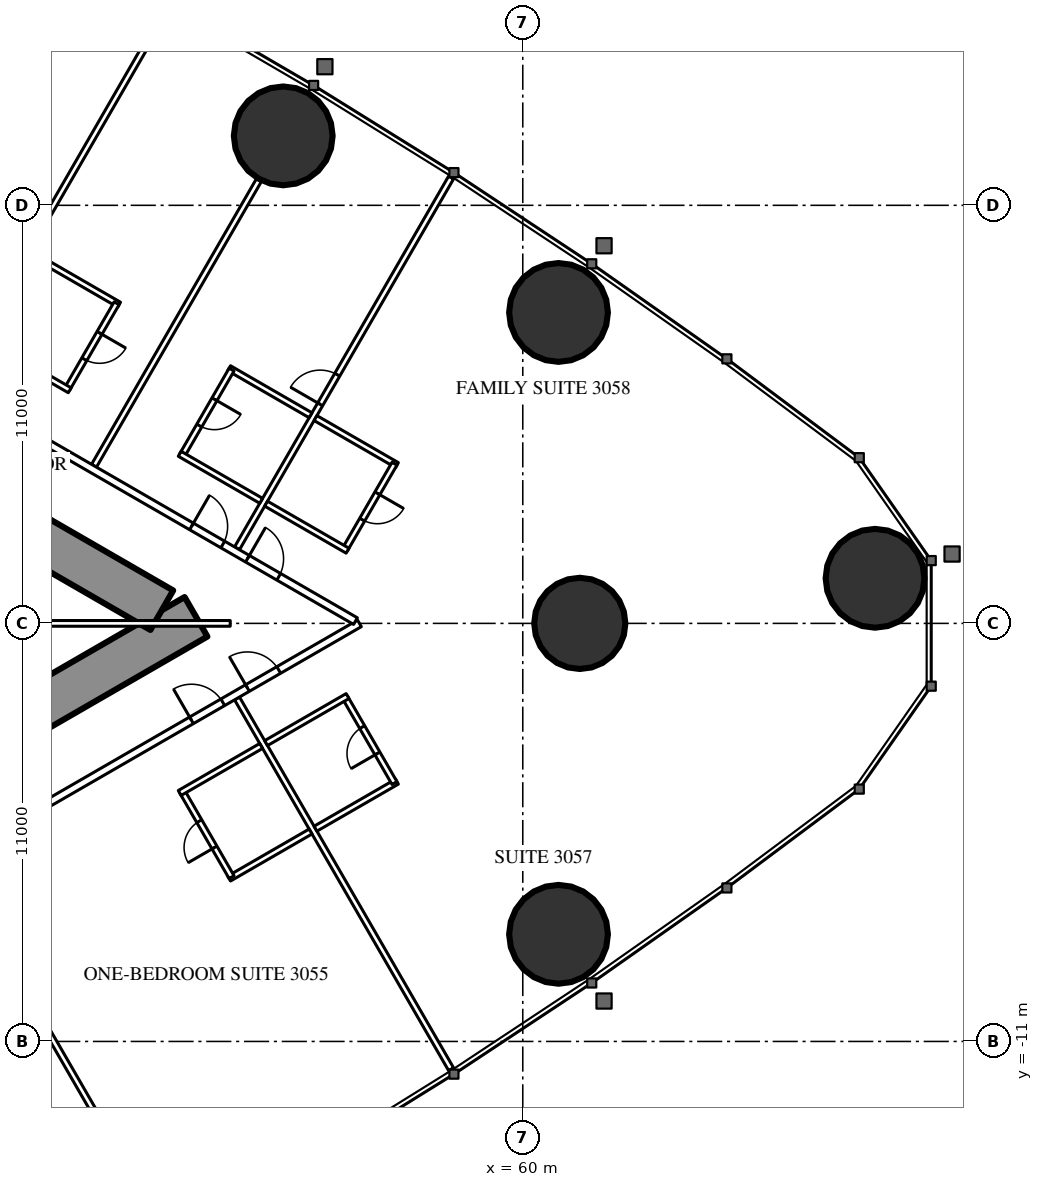
"""IFC4 building model, lengths in metres.
Left out: names, types, materials, properties, quantities, classifications, styles, units other than length and angle.
Written with IfcOpenShell. Run it as: python <this file> out.ifc"""

import sys

from ifc_helpers import new_model, si_unit, direction, frame, frame_2d, origin, origin_2d, place, context, subcontext, project, spatial, rectangle, circle, hollow_circle, extrude, element, fill, save


model = new_model("IFC4")
c1 = context("Model", 3, precision=1e-05, world=origin(), true_north=direction((0.0, 1.0)))
c2 = subcontext(c1, "Body", "Model", "MODEL_VIEW")
j1 = project(units=[si_unit("LENGTHUNIT", "METRE"), si_unit("PLANEANGLEUNIT", "RADIAN")], contexts=[c1])
p1 = place(None, origin())
s1 = spatial("IfcSite", under=j1, at=p1, CompositionType="ELEMENT")
p2 = place(p1, origin())
s2 = spatial("IfcBuilding", under=s1, at=p2, CompositionType="ELEMENT")
p3 = place(p2, frame((0.0, 0.0, 115.1)))
s3 = spatial("IfcBuildingStorey", under=s2, at=p3, CompositionType="ELEMENT", Elevation=115.1)
for number, where, z_axis, x_axis in (
    (1, (69.269, 1.187, 0.0), (0.0, 0.0, 1.0), (1.0, 0.0, 0.0)),
    (2, (60.941, 8.181, 0.0), (0.0, 0.0, 1.0), (1.0, 0.0, 0.0)),
    (3, (53.697, 12.827, 0.0), (0.0, 0.0, 1.0), (1.0, 0.0, 0.0)),
    (4, (60.941, -8.181, 0.0), (0.0, 0.0, 1.0), (1.0, 0.0, 0.0)),
):
    element("IfcColumn", number, at=place(p3, frame(where, z_axis=z_axis, x_axis=x_axis)), inside=s3, PredefinedType="COLUMN", context=c2, shape_type="SweptSolid", body=[
        extrude(hollow_circle(Radius=1.3, WallThickness=0.1, at=origin_2d()), origin(), (0.0, 0.0, 1.0), 3.5),
    ])
p4 = place(p3, frame((61.5, 0.0, 0.0), z_axis=(0.0, 0.0, 1.0), x_axis=(1.0, 0.0, 0.0)))
e5 = element("IfcColumn", 5, at=p4, inside=s3, PredefinedType="COLUMN", context=c2, shape_type="SweptSolid", body=[
    extrude(circle(Radius=1.2, at=origin_2d()), origin(), (0.0, 0.0, 1.0), 3.5),
])
p5 = place(p3, frame((27.2, -13.8, 0.0), z_axis=(0.0, 0.0, 1.0), x_axis=(0.866027159892, 0.499996958321, 0.0)))
e6 = element("IfcWall", 6, at=p5, inside=s3, PredefinedType="SHEAR", context=c2, shape_type="SweptSolid", body=[
    extrude(rectangle(XDim=27.947, YDim=1.2, at=frame_2d((13.973, 0.0))), origin(), (0.0, 0.0, 1.0), 3.5),
])
p6 = place(p5, frame((4.6, 0.0, 0.0)))
e7 = element("IfcOpeningElement", 7, at=p6, cuts=e6, PredefinedType="OPENING", context=c2, shape_type="SweptSolid", body=[
    extrude(rectangle(XDim=1.0, YDim=2.2, at=frame_2d((0.5, 1.1))), frame((0.0, 0.61, 0.0), z_axis=(0.0, -1.0, 0.0), x_axis=(1.0, 0.0, 0.0)), (0.0, 0.0, 1.0), 1.22),
])
p7 = place(p5, frame((13.395, 0.0, 0.0)))
e8 = element("IfcOpeningElement", 8, at=p7, cuts=e6, PredefinedType="OPENING", context=c2, shape_type="SweptSolid", body=[
    extrude(rectangle(XDim=1.8, YDim=2.2, at=frame_2d((0.9, 1.1))), frame((0.0, 0.61, 0.0), z_axis=(0.0, -1.0, 0.0), x_axis=(1.0, 0.0, 0.0)), (0.0, 0.0, 1.0), 1.22),
])
p8 = place(p3, frame((27.2, 13.8, 0.0), z_axis=(0.0, 0.0, 1.0), x_axis=(0.866024515034, -0.500001539357, 0.0)))
e9 = element("IfcWall", 9, at=p8, inside=s3, PredefinedType="SHEAR", context=c2, shape_type="SweptSolid", body=[
    extrude(rectangle(XDim=26.907, YDim=1.2, at=frame_2d((13.454, 0.0))), origin(), (0.0, 0.0, 1.0), 3.5),
])
p9 = place(p8, frame((4.6, 0.0, 0.0)))
e10 = element("IfcOpeningElement", 10, at=p9, cuts=e9, PredefinedType="OPENING", context=c2, shape_type="SweptSolid", body=[
    extrude(rectangle(XDim=1.0, YDim=2.2, at=frame_2d((0.5, 1.1))), frame((0.0, 0.61, 0.0), z_axis=(0.0, -1.0, 0.0), x_axis=(1.0, 0.0, 0.0)), (0.0, 0.0, 1.0), 1.22),
])
p10 = place(p8, frame((13.395, 0.0, 0.0)))
e11 = element("IfcOpeningElement", 11, at=p10, cuts=e9, PredefinedType="OPENING", context=c2, shape_type="SweptSolid", body=[
    extrude(rectangle(XDim=1.8, YDim=2.2, at=frame_2d((0.9, 1.1))), frame((0.0, 0.61, 0.0), z_axis=(0.0, -1.0, 0.0), x_axis=(1.0, 0.0, 0.0)), (0.0, 0.0, 1.0), 1.22),
])
p11 = place(p3, frame((44.954, -6.321, 0.0), z_axis=(0.0, 0.0, 1.0), x_axis=(0.500018676722, -0.866014620505, 0.0)))
e12 = element("IfcWall", 12, at=p11, inside=s3, PredefinedType="PARTITIONING", context=c2, shape_type="SweptSolid", body=[
    extrude(rectangle(XDim=8.704, YDim=0.15, at=frame_2d((4.352, 0.0))), origin(), (0.0, 0.0, 1.0), 2.2),
])
p12 = place(p3, frame((52.481, -1.975, 0.0), z_axis=(0.0, 0.0, 1.0), x_axis=(0.500003867771, -0.866023170714, 0.0)))
e13 = element("IfcWall", 13, at=p12, inside=s3, PredefinedType="PARTITIONING", context=c2, shape_type="SweptSolid", body=[
    extrude(rectangle(XDim=11.265, YDim=0.15, at=frame_2d((5.632, 0.0))), origin(), (0.0, 0.0, 1.0), 3.25),
])
p13 = place(p3, frame((44.954, 6.321, 0.0), z_axis=(0.0, 0.0, 1.0), x_axis=(0.500009815811, 0.866019736549, 0.0)))
e14 = element("IfcWall", 14, at=p13, inside=s3, PredefinedType="PARTITIONING", context=c2, shape_type="SweptSolid", body=[
    extrude(rectangle(XDim=11.424, YDim=0.15, at=frame_2d((5.712, 0.0))), origin(), (0.0, 0.0, 1.0), 3.25),
])
p14 = place(p3, frame((48.719, 4.147, 0.0), z_axis=(0.0, 0.0, 1.0), x_axis=(0.499993328235, 0.866029255696, 0.0)))
e15 = element("IfcWall", 15, at=p14, inside=s3, PredefinedType="PARTITIONING", context=c2, shape_type="SweptSolid", body=[
    extrude(rectangle(XDim=8.686, YDim=0.15, at=frame_2d((4.343, 0.0))), origin(), (0.0, 0.0, 1.0), 2.2),
])
p15 = place(p3, frame((52.481, 1.975, 0.0), z_axis=(0.0, 0.0, 1.0), x_axis=(0.500003867771, 0.866023170714, 0.0)))
e16 = element("IfcWall", 16, at=p15, inside=s3, PredefinedType="PARTITIONING", context=c2, shape_type="SweptSolid", body=[
    extrude(rectangle(XDim=11.265, YDim=0.15, at=frame_2d((5.632, 0.0))), origin(), (0.0, 0.0, 1.0), 3.25),
])
p16 = place(p15, frame((4.375, 0.0, 0.0)))
e17 = element("IfcOpeningElement", 17, at=p16, cuts=e16, PredefinedType="OPENING", context=c2, shape_type="SweptSolid", body=[
    extrude(rectangle(XDim=0.9, YDim=2.2, at=frame_2d((0.45, 1.1))), frame((0.0, 0.085, 0.0), z_axis=(0.0, -1.0, 0.0), x_axis=(1.0, 0.0, 0.0)), (0.0, 0.0, 1.0), 0.17),
])
p17 = place(p3, frame((37.96, -10.243, 0.0), z_axis=(0.0, 0.0, 1.0), x_axis=(0.866026429433, 0.499998223521, 0.0)))
e18 = element("IfcWall", 18, at=p17, inside=s3, PredefinedType="PARTITIONING", context=c2, shape_type="SweptSolid", body=[
    extrude(rectangle(XDim=20.487, YDim=0.2, at=frame_2d((10.243, 0.0))), origin(), (0.0, 0.0, 1.0), 3.25),
])
p18 = place(p17, frame((4.343, 0.0, 0.0)))
e19 = element("IfcOpeningElement", 19, at=p18, cuts=e18, PredefinedType="OPENING", context=c2, shape_type="SweptSolid", body=[
    extrude(rectangle(XDim=0.95, YDim=2.2, at=frame_2d((0.475, 1.1))), frame((0.0, 0.11, 0.0), z_axis=(0.0, -1.0, 0.0), x_axis=(1.0, 0.0, 0.0)), (0.0, 0.0, 1.0), 0.22),
])
p19 = place(p17, frame((15.385, 0.0, 0.0)))
e20 = element("IfcOpeningElement", 20, at=p19, cuts=e18, PredefinedType="OPENING", context=c2, shape_type="SweptSolid", body=[
    extrude(rectangle(XDim=0.95, YDim=2.2, at=frame_2d((0.475, 1.1))), frame((0.0, 0.11, 0.0), z_axis=(0.0, -1.0, 0.0), x_axis=(1.0, 0.0, 0.0)), (0.0, 0.0, 1.0), 0.22),
])
p20 = place(p17, frame((17.085, 0.0, 0.0)))
e21 = element("IfcOpeningElement", 21, at=p20, cuts=e18, PredefinedType="OPENING", context=c2, shape_type="SweptSolid", body=[
    extrude(rectangle(XDim=0.95, YDim=2.2, at=frame_2d((0.475, 1.1))), frame((0.0, 0.11, 0.0), z_axis=(0.0, -1.0, 0.0), x_axis=(1.0, 0.0, 0.0)), (0.0, 0.0, 1.0), 0.22),
])
p21 = place(p17, frame((1.048, 0.0, 0.0)))
e22 = element("IfcOpeningElement", 22, at=p21, cuts=e18, PredefinedType="OPENING", context=c2, shape_type="SweptSolid", body=[
    extrude(rectangle(XDim=1.8, YDim=2.2, at=frame_2d((0.9, 1.1))), frame((0.0, 0.11, 0.0), z_axis=(0.0, -1.0, 0.0), x_axis=(1.0, 0.0, 0.0)), (0.0, 0.0, 1.0), 0.22),
])
p22 = place(p3, frame((44.925, 6.222, 0.0), z_axis=(0.0, 0.0, 1.0), x_axis=(0.866025590081, -0.499999677325, 0.0)))
e23 = element("IfcWall", 23, at=p22, inside=s3, PredefinedType="PARTITIONING", context=c2, shape_type="SweptSolid", body=[
    extrude(rectangle(XDim=12.324, YDim=0.2, at=frame_2d((6.162, 0.0))), origin(), (0.0, 0.0, 1.0), 3.25),
])
p23 = place(p22, frame((9.042, 0.0, 0.0)))
e24 = element("IfcOpeningElement", 24, at=p23, cuts=e23, PredefinedType="OPENING", context=c2, shape_type="SweptSolid", body=[
    extrude(rectangle(XDim=0.95, YDim=2.2, at=frame_2d((0.475, 1.1))), frame((0.0, 0.11, 0.0), z_axis=(0.0, -1.0, 0.0), x_axis=(1.0, 0.0, 0.0)), (0.0, 0.0, 1.0), 0.22),
])
p24 = place(p22, frame((7.342, 0.0, 0.0)))
e25 = element("IfcOpeningElement", 25, at=p24, cuts=e23, PredefinedType="OPENING", context=c2, shape_type="SweptSolid", body=[
    extrude(rectangle(XDim=0.95, YDim=2.2, at=frame_2d((0.475, 1.1))), frame((0.0, 0.11, 0.0), z_axis=(0.0, -1.0, 0.0), x_axis=(1.0, 0.0, 0.0)), (0.0, 0.0, 1.0), 0.22),
])
p25 = place(p22, frame((0.6, 0.0, 0.0)))
e26 = element("IfcOpeningElement", 26, at=p25, cuts=e23, PredefinedType="OPENING", context=c2, shape_type="SweptSolid", body=[
    extrude(rectangle(XDim=0.95, YDim=2.2, at=frame_2d((0.475, 1.1))), frame((0.0, 0.11, 0.0), z_axis=(0.0, -1.0, 0.0), x_axis=(1.0, 0.0, 0.0)), (0.0, 0.0, 1.0), 0.22),
])
p26 = place(p3, frame((52.273, -6.714, 0.0), z_axis=(0.0, 0.0, 1.0), x_axis=(0.866031185235, 0.4999899861, 0.0)))
e27 = element("IfcWall", 27, at=p26, inside=s3, PredefinedType="PARTITIONING", context=c2, shape_type="SweptSolid", body=[
    extrude(rectangle(XDim=2.475, YDim=0.15, at=frame_2d((1.238, 0.0))), origin(), (0.0, 0.0, 1.0), 3.25),
])
p27 = place(p3, frame((51.038, -4.425, 0.0), z_axis=(0.0, 0.0, 1.0), x_axis=(0.49997716683, -0.86603858612, 0.0)))
e28 = element("IfcWall", 28, at=p27, inside=s3, PredefinedType="PARTITIONING", context=c2, shape_type="SweptSolid", body=[
    extrude(rectangle(XDim=2.6, YDim=0.15, at=frame_2d((1.3, 0.0))), origin(), (0.0, 0.0, 1.0), 3.25),
])
p28 = place(p27, frame((0.9, 0.0, 0.0)))
e29 = element("IfcOpeningElement", 29, at=p28, cuts=e28, PredefinedType="OPENING", context=c2, shape_type="SweptSolid", body=[
    extrude(rectangle(XDim=0.8, YDim=2.2, at=frame_2d((0.4, 1.1))), frame((0.0, 0.085, 0.0), z_axis=(0.0, -1.0, 0.0), x_axis=(1.0, 0.0, 0.0)), (0.0, 0.0, 1.0), 0.17),
])
p29 = place(p3, frame((50.973, -4.462, 0.0), z_axis=(0.0, 0.0, 1.0), x_axis=(0.866031185235, 0.4999899861, 0.0)))
e30 = element("IfcWall", 30, at=p29, inside=s3, PredefinedType="PARTITIONING", context=c2, shape_type="SweptSolid", body=[
    extrude(rectangle(XDim=2.475, YDim=0.15, at=frame_2d((1.238, 0.0))), origin(), (0.0, 0.0, 1.0), 3.25),
])
p30 = place(p3, frame((54.546, -5.402, 0.0), z_axis=(0.0, 0.0, 1.0), x_axis=(0.866006523861, 0.500032699561, 0.0)))
e31 = element("IfcWall", 31, at=p30, inside=s3, PredefinedType="PARTITIONING", context=c2, shape_type="SweptSolid", body=[
    extrude(rectangle(XDim=2.475, YDim=0.15, at=frame_2d((1.237, 0.0))), origin(), (0.0, 0.0, 1.0), 3.25),
])
p31 = place(p3, frame((55.325, -1.95, 0.0), z_axis=(0.0, 0.0, 1.0), x_axis=(0.500006934395, -0.866021400173, 0.0)))
e32 = element("IfcWall", 32, at=p31, inside=s3, PredefinedType="PARTITIONING", context=c2, shape_type="SweptSolid", body=[
    extrude(rectangle(XDim=2.6, YDim=0.15, at=frame_2d((1.3, 0.0))), origin(), (0.0, 0.0, 1.0), 3.25),
])
p32 = place(p31, frame((0.9, 0.0, 0.0)))
e33 = element("IfcOpeningElement", 33, at=p32, cuts=e32, PredefinedType="OPENING", context=c2, shape_type="SweptSolid", body=[
    extrude(rectangle(XDim=0.8, YDim=2.2, at=frame_2d((0.4, 1.1))), frame((0.0, 0.085, 0.0), z_axis=(0.0, -1.0, 0.0), x_axis=(1.0, 0.0, 0.0)), (0.0, 0.0, 1.0), 0.17),
])
for number, where, z_axis, x_axis in (
    (34, (53.246, -3.15, 0.0), (0.0, 0.0, 1.0), (0.866, 0.5, 0.0)),
    (35, (54.546, 5.402, 0.0), (0.0, 0.0, 1.0), (0.866, -0.5, 0.0)),
):
    element("IfcWall", number, at=place(p3, frame(where, z_axis=z_axis, x_axis=x_axis)), inside=s3, PredefinedType="PARTITIONING", context=c2, shape_type="SweptSolid", body=[
        extrude(rectangle(XDim=2.475, YDim=0.15, at=frame_2d((1.237, 0.0))), origin(), (0.0, 0.0, 1.0), 3.25),
    ])
p33 = place(p3, frame((55.325, 1.95, 0.0), z_axis=(0.0, 0.0, 1.0), x_axis=(0.500006934395, 0.866021400173, 0.0)))
e36 = element("IfcWall", 36, at=p33, inside=s3, PredefinedType="PARTITIONING", context=c2, shape_type="SweptSolid", body=[
    extrude(rectangle(XDim=2.6, YDim=0.15, at=frame_2d((1.3, 0.0))), origin(), (0.0, 0.0, 1.0), 3.25),
])
p34 = place(p33, frame((0.9, 0.0, 0.0)))
e37 = element("IfcOpeningElement", 37, at=p34, cuts=e36, PredefinedType="OPENING", context=c2, shape_type="SweptSolid", body=[
    extrude(rectangle(XDim=0.8, YDim=2.2, at=frame_2d((0.4, 1.1))), frame((0.0, 0.085, 0.0), z_axis=(0.0, -1.0, 0.0), x_axis=(1.0, 0.0, 0.0)), (0.0, 0.0, 1.0), 0.17),
])
p35 = place(p3, frame((53.246, 3.15, 0.0), z_axis=(0.0, 0.0, 1.0), x_axis=(0.866006523861, -0.500032699561, 0.0)))
e38 = element("IfcWall", 38, at=p35, inside=s3, PredefinedType="PARTITIONING", context=c2, shape_type="SweptSolid", body=[
    extrude(rectangle(XDim=2.475, YDim=0.15, at=frame_2d((1.237, 0.0))), origin(), (0.0, 0.0, 1.0), 3.25),
])
p36 = place(p3, frame((52.273, 6.714, 0.0), z_axis=(0.0, 0.0, 1.0), x_axis=(0.866031185235, -0.4999899861, 0.0)))
e39 = element("IfcWall", 39, at=p36, inside=s3, PredefinedType="PARTITIONING", context=c2, shape_type="SweptSolid", body=[
    extrude(rectangle(XDim=2.475, YDim=0.15, at=frame_2d((1.238, 0.0))), origin(), (0.0, 0.0, 1.0), 3.25),
])
p37 = place(p3, frame((51.038, 4.425, 0.0), z_axis=(0.0, 0.0, 1.0), x_axis=(0.49997716683, 0.86603858612, 0.0)))
e40 = element("IfcWall", 40, at=p37, inside=s3, PredefinedType="PARTITIONING", context=c2, shape_type="SweptSolid", body=[
    extrude(rectangle(XDim=2.6, YDim=0.15, at=frame_2d((1.3, 0.0))), origin(), (0.0, 0.0, 1.0), 3.25),
])
p38 = place(p37, frame((0.9, 0.0, 0.0)))
e41 = element("IfcOpeningElement", 41, at=p38, cuts=e40, PredefinedType="OPENING", context=c2, shape_type="SweptSolid", body=[
    extrude(rectangle(XDim=0.8, YDim=2.2, at=frame_2d((0.4, 1.1))), frame((0.0, 0.085, 0.0), z_axis=(0.0, -1.0, 0.0), x_axis=(1.0, 0.0, 0.0)), (0.0, 0.0, 1.0), 0.17),
])
p39 = place(p3, frame((50.973, 4.462, 0.0), z_axis=(0.0, 0.0, 1.0), x_axis=(0.866031185235, -0.4999899861, 0.0)))
e42 = element("IfcWall", 42, at=p39, inside=s3, PredefinedType="PARTITIONING", context=c2, shape_type="SweptSolid", body=[
    extrude(rectangle(XDim=2.475, YDim=0.15, at=frame_2d((1.238, 0.0))), origin(), (0.0, 0.0, 1.0), 3.25),
])
p40 = place(p3, frame((47.235, 9.623, 0.0), z_axis=(0.0, 0.0, 1.0), x_axis=(0.866006523861, -0.500032699561, 0.0)))
e43 = element("IfcWall", 43, at=p40, inside=s3, PredefinedType="PARTITIONING", context=c2, shape_type="SweptSolid", body=[
    extrude(rectangle(XDim=2.475, YDim=0.15, at=frame_2d((1.237, 0.0))), origin(), (0.0, 0.0, 1.0), 3.25),
])
p41 = place(p3, frame((48.013, 6.171, 0.0), z_axis=(0.0, 0.0, 1.0), x_axis=(0.500006934395, 0.866021400173, 0.0)))
e44 = element("IfcWall", 44, at=p41, inside=s3, PredefinedType="PARTITIONING", context=c2, shape_type="SweptSolid", body=[
    extrude(rectangle(XDim=2.6, YDim=0.15, at=frame_2d((1.3, 0.0))), origin(), (0.0, 0.0, 1.0), 3.25),
])
p42 = place(p41, frame((0.9, 0.0, 0.0)))
e45 = element("IfcOpeningElement", 45, at=p42, cuts=e44, PredefinedType="OPENING", context=c2, shape_type="SweptSolid", body=[
    extrude(rectangle(XDim=0.8, YDim=2.2, at=frame_2d((0.4, 1.1))), frame((0.0, 0.085, 0.0), z_axis=(0.0, -1.0, 0.0), x_axis=(1.0, 0.0, 0.0)), (0.0, 0.0, 1.0), 0.17),
])
p43 = place(p3, frame((45.935, 7.371, 0.0), z_axis=(0.0, 0.0, 1.0), x_axis=(0.866031185235, -0.4999899861, 0.0)))
e46 = element("IfcWall", 46, at=p43, inside=s3, PredefinedType="PARTITIONING", context=c2, shape_type="SweptSolid", body=[
    extrude(rectangle(XDim=2.475, YDim=0.15, at=frame_2d((1.238, 0.0))), origin(), (0.0, 0.0, 1.0), 3.25),
])
p44 = place(p3, frame((44.575, 0.0, 0.0), z_axis=(0.0, 0.0, 1.0), x_axis=(1.0, 0.0, 0.0)))
e47 = element("IfcWall", 47, at=p44, inside=s3, PredefinedType="PARTITIONING", context=c2, shape_type="SweptSolid", body=[
    extrude(rectangle(XDim=7.727, YDim=0.15, at=frame_2d((3.864, 0.0))), origin(), (0.0, 0.0, 1.0), 2.2),
])
p45 = place(p28, origin())
e48 = element("IfcDoor", 48, at=p45, inside=s3, OperationType="SINGLE_SWING_RIGHT", PredefinedType="DOOR", context=c2, shape_type="SweptSolid", body=[
    extrude(rectangle(XDim=0.8, YDim=2.2, at=frame_2d((0.4, 1.1))), frame((0.0, 0.025, 0.0), z_axis=(0.0, -1.0, 0.0), x_axis=(1.0, 0.0, 0.0)), (0.0, 0.0, 1.0), 0.05),
])
fill(e29, e48)
p46 = place(p19, origin())
e49 = element("IfcDoor", 49, at=p46, inside=s3, OperationType="SINGLE_SWING_LEFT", PredefinedType="DOOR", context=c2, shape_type="SweptSolid", body=[
    extrude(rectangle(XDim=0.95, YDim=2.2, at=frame_2d((0.475, 1.1))), frame((0.0, 0.025, 0.0), z_axis=(0.0, -1.0, 0.0), x_axis=(1.0, 0.0, 0.0)), (0.0, 0.0, 1.0), 0.05),
])
fill(e20, e49)
p47 = place(p32, origin())
e50 = element("IfcDoor", 50, at=p47, inside=s3, OperationType="SINGLE_SWING_RIGHT", PredefinedType="DOOR", context=c2, shape_type="SweptSolid", body=[
    extrude(rectangle(XDim=0.8, YDim=2.2, at=frame_2d((0.4, 1.1))), frame((0.0, 0.025, 0.0), z_axis=(0.0, -1.0, 0.0), x_axis=(1.0, 0.0, 0.0)), (0.0, 0.0, 1.0), 0.05),
])
fill(e33, e50)
p48 = place(p20, origin())
e51 = element("IfcDoor", 51, at=p48, inside=s3, OperationType="SINGLE_SWING_LEFT", PredefinedType="DOOR", context=c2, shape_type="SweptSolid", body=[
    extrude(rectangle(XDim=0.95, YDim=2.2, at=frame_2d((0.475, 1.1))), frame((0.0, 0.025, 0.0), z_axis=(0.0, -1.0, 0.0), x_axis=(1.0, 0.0, 0.0)), (0.0, 0.0, 1.0), 0.05),
])
fill(e21, e51)
p49 = place(p34, origin())
e52 = element("IfcDoor", 52, at=p49, inside=s3, OperationType="SINGLE_SWING_RIGHT", PredefinedType="DOOR", context=c2, shape_type="SweptSolid", body=[
    extrude(rectangle(XDim=0.8, YDim=2.2, at=frame_2d((0.4, 1.1))), frame((0.0, 0.025, 0.0), z_axis=(0.0, -1.0, 0.0), x_axis=(1.0, 0.0, 0.0)), (0.0, 0.0, 1.0), 0.05),
])
fill(e37, e52)
p50 = place(p23, origin())
e53 = element("IfcDoor", 53, at=p50, inside=s3, OperationType="SINGLE_SWING_LEFT", PredefinedType="DOOR", context=c2, shape_type="SweptSolid", body=[
    extrude(rectangle(XDim=0.95, YDim=2.2, at=frame_2d((0.475, 1.1))), frame((0.0, 0.025, 0.0), z_axis=(0.0, -1.0, 0.0), x_axis=(1.0, 0.0, 0.0)), (0.0, 0.0, 1.0), 0.05),
])
fill(e24, e53)
p51 = place(p38, origin())
e54 = element("IfcDoor", 54, at=p51, inside=s3, OperationType="SINGLE_SWING_RIGHT", PredefinedType="DOOR", context=c2, shape_type="SweptSolid", body=[
    extrude(rectangle(XDim=0.8, YDim=2.2, at=frame_2d((0.4, 1.1))), frame((0.0, 0.025, 0.0), z_axis=(0.0, -1.0, 0.0), x_axis=(1.0, 0.0, 0.0)), (0.0, 0.0, 1.0), 0.05),
])
fill(e41, e54)
p52 = place(p24, origin())
e55 = element("IfcDoor", 55, at=p52, inside=s3, OperationType="SINGLE_SWING_LEFT", PredefinedType="DOOR", context=c2, shape_type="SweptSolid", body=[
    extrude(rectangle(XDim=0.95, YDim=2.2, at=frame_2d((0.475, 1.1))), frame((0.0, 0.025, 0.0), z_axis=(0.0, -1.0, 0.0), x_axis=(1.0, 0.0, 0.0)), (0.0, 0.0, 1.0), 0.05),
])
fill(e25, e55)
p53 = place(p42, origin())
e56 = element("IfcDoor", 56, at=p53, inside=s3, OperationType="SINGLE_SWING_RIGHT", PredefinedType="DOOR", context=c2, shape_type="SweptSolid", body=[
    extrude(rectangle(XDim=0.8, YDim=2.2, at=frame_2d((0.4, 1.1))), frame((0.0, 0.025, 0.0), z_axis=(0.0, -1.0, 0.0), x_axis=(1.0, 0.0, 0.0)), (0.0, 0.0, 1.0), 0.05),
])
fill(e45, e56)
p54 = place(p16, origin())
e57 = element("IfcDoor", 57, at=p54, inside=s3, OperationType="SINGLE_SWING_LEFT", PredefinedType="DOOR", context=c2, shape_type="SweptSolid", body=[
    extrude(rectangle(XDim=0.9, YDim=2.2, at=frame_2d((0.45, 1.1))), frame((0.0, 0.025, 0.0), z_axis=(0.0, -1.0, 0.0), x_axis=(1.0, 0.0, 0.0)), (0.0, 0.0, 1.0), 0.05),
])
fill(e17, e57)
save(model, sys.argv[1])
